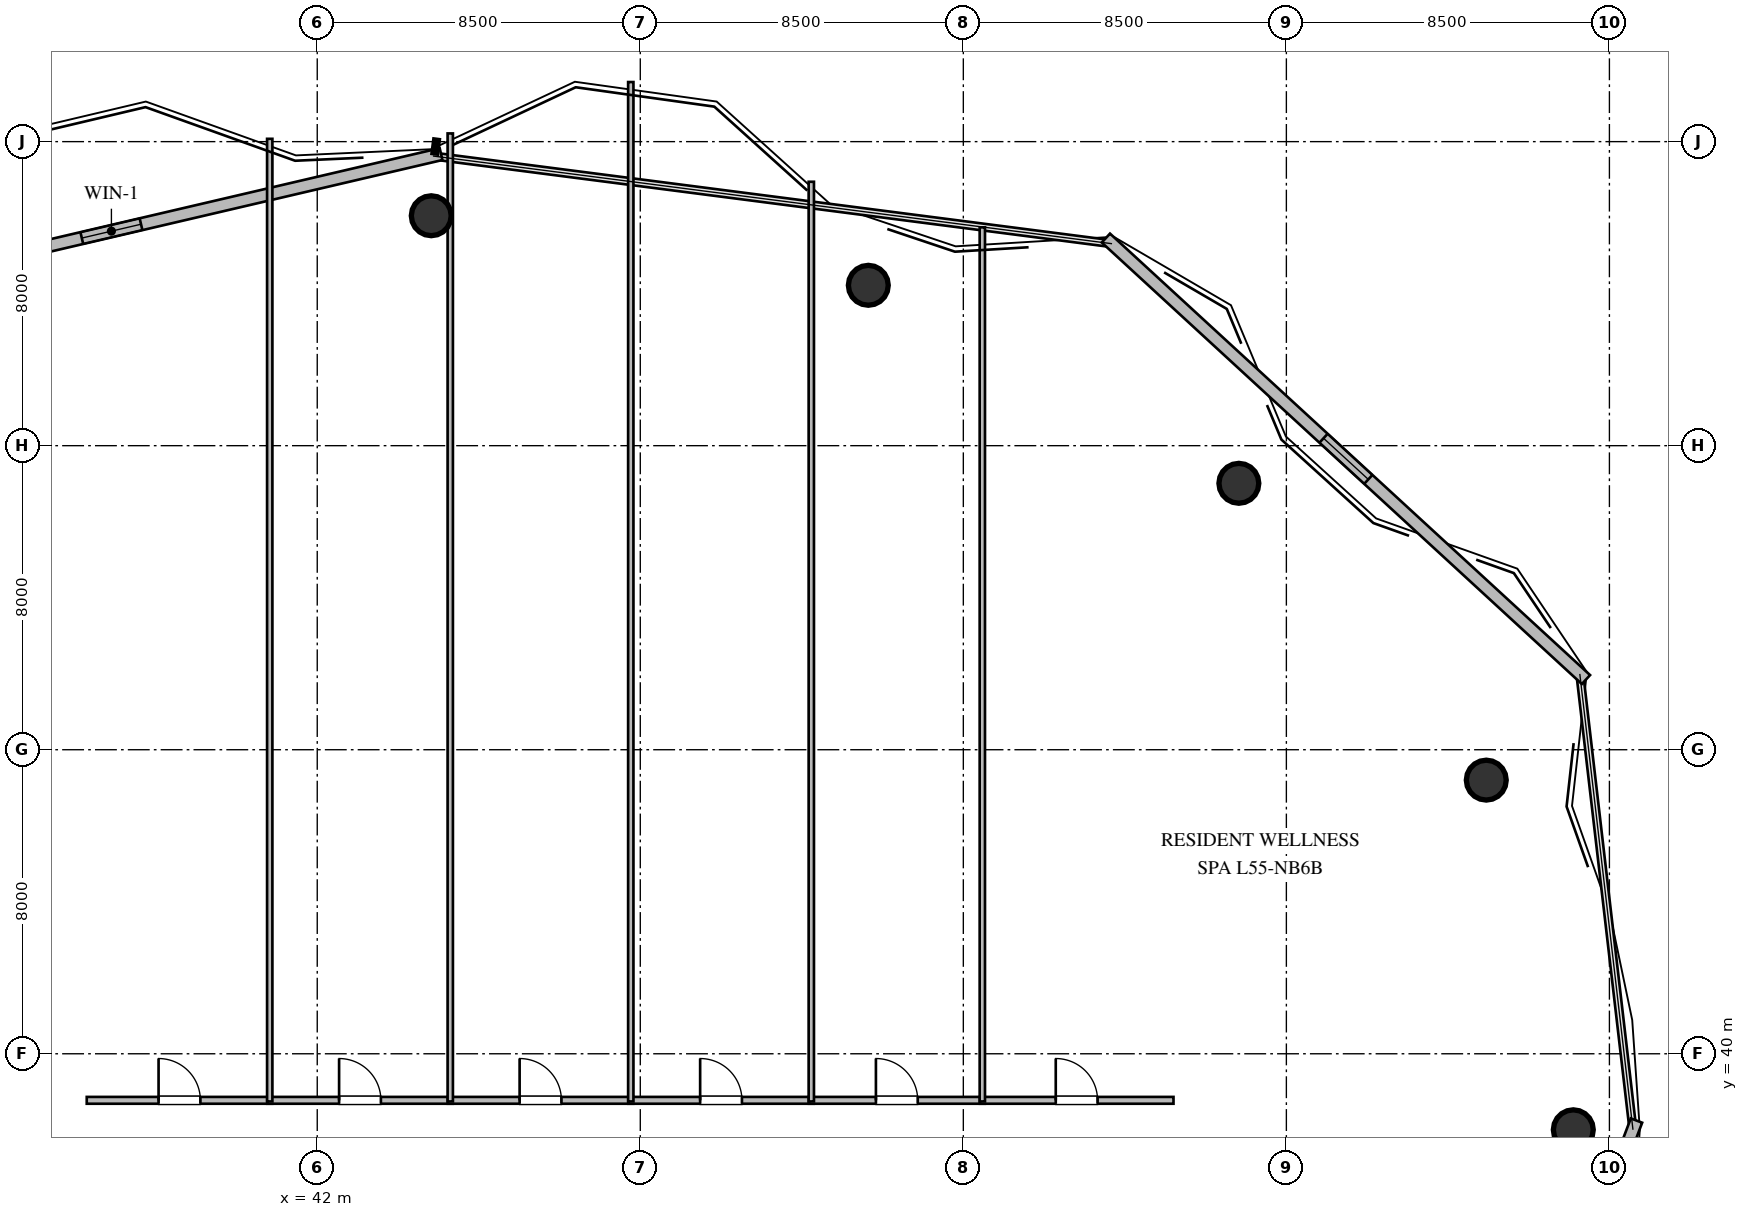
"""IFC4 building model, lengths in metres.
Left out: names, types, materials, properties, quantities, classifications, styles, units other than length and angle.
Written with IfcOpenShell. Run it as: python <this file> out.ifc"""

import sys

from ifc_helpers import new_model, si_unit, direction, frame, frame_2d, origin, origin_2d, place, context, subcontext, project, spatial, rectangle, circle, extrude, element, fill, save


model = new_model("IFC4")
c1 = context("Model", 3, precision=1e-05, world=origin(), true_north=direction((0.0, 1.0)))
c2 = subcontext(c1, "Body", "Model", "MODEL_VIEW")
j1 = project(units=[si_unit("LENGTHUNIT", "METRE"), si_unit("PLANEANGLEUNIT", "RADIAN")], contexts=[c1])
p1 = place(None, origin())
s1 = spatial("IfcSite", under=j1, at=p1, CompositionType="ELEMENT")
p2 = place(p1, origin())
s2 = spatial("IfcBuilding", under=s1, at=p2, CompositionType="ELEMENT")
p3 = place(p2, frame((0.0, 0.0, 210.0)))
s3 = spatial("IfcBuildingStorey", under=s2, at=p3, CompositionType="ELEMENT", Elevation=210.0)
for number, where, z_axis, x_axis in (
    (1, (75.05, 38.0, 0.0), (0.0, 0.0, 1.0), (1.0, 0.0, 0.0)),
    (2, (72.76, 47.2, 0.0), (0.0, 0.0, 1.0), (1.0, 0.0, 0.0)),
    (3, (66.25, 55.01, 0.0), (0.0, 0.0, 1.0), (1.0, 0.0, 0.0)),
    (4, (56.5, 60.22, 0.0), (0.0, 0.0, 1.0), (1.0, 0.0, 0.0)),
    (5, (45.0, 62.05, 0.0), (0.0, 0.0, 1.0), (1.0, 0.0, 0.0)),
):
    element("IfcColumn", number, at=place(p3, frame(where, z_axis=z_axis, x_axis=x_axis)), inside=s3, PredefinedType="COLUMN", context=c2, shape_type="SweptSolid", body=[
        extrude(circle(Radius=0.525, at=origin_2d()), origin(), (0.0, 0.0, 1.0), 3.6),
    ])
p4 = place(p3, frame((76.712, 38.243, 0.0), z_axis=(0.0, 0.0, 1.0), x_axis=(-0.353659523244, -0.935374225441, 0.0)))
e6 = element("IfcWall", 6, at=p4, inside=s3, PredefinedType="STANDARD", context=c2, shape_type="SweptSolid", body=[
    extrude(rectangle(XDim=14.172, YDim=0.32, at=frame_2d((7.086, 0.0))), origin(), (0.0, 0.0, 1.0), 3.36),
])
p5 = place(p3, frame((27.909, 59.617, 0.0), z_axis=(0.0, 0.0, 1.0), x_axis=(0.973753606594, 0.227604731158, 0.0)))
e7 = element("IfcWall", 7, at=p5, inside=s3, PredefinedType="STANDARD", context=c2, shape_type="SweptSolid", body=[
    extrude(rectangle(XDim=17.817, YDim=0.32, at=frame_2d((8.908, 0.0))), origin(), (0.0, 0.0, 1.0), 3.36),
])
p6 = place(p5, frame((8.109, 0.0, 1.05)))
e8 = element("IfcOpeningElement", 8, at=p6, cuts=e7, PredefinedType="OPENING", context=c2, shape_type="SweptSolid", body=[
    extrude(rectangle(XDim=1.6, YDim=1.5, at=frame_2d((0.8, 0.75))), frame((0.0, 0.17, 0.0), z_axis=(0.0, -1.0, 0.0), x_axis=(1.0, 0.0, 0.0)), (0.0, 0.0, 1.0), 0.34),
])
p7 = place(p3, frame((62.751, 61.463, 0.0), z_axis=(0.0, 0.0, 1.0), x_axis=(0.736063690764, -0.676912286149, 0.0)))
e9 = element("IfcWall", 9, at=p7, inside=s3, PredefinedType="STANDARD", context=c2, shape_type="SweptSolid", body=[
    extrude(rectangle(XDim=17.162, YDim=0.32, at=frame_2d((8.581, 0.0))), origin(), (0.0, 0.0, 1.0), 3.36),
])
p8 = place(p7, frame((7.781, 0.0, 1.05)))
e10 = element("IfcOpeningElement", 10, at=p8, cuts=e9, PredefinedType="OPENING", context=c2, shape_type="SweptSolid", body=[
    extrude(rectangle(XDim=1.6, YDim=1.5, at=frame_2d((0.8, 0.75))), frame((0.0, 0.17, 0.0), z_axis=(0.0, -1.0, 0.0), x_axis=(1.0, 0.0, 0.0)), (0.0, 0.0, 1.0), 0.34),
])
p9 = place(p3, frame((35.935, 38.775, 0.0), z_axis=(0.0, 0.0, 1.0), x_axis=(1.0, 0.0, 0.0)))
e11 = element("IfcWall", 11, at=p9, inside=s3, PredefinedType="PARTITIONING", context=c2, shape_type="SweptSolid", body=[
    extrude(rectangle(XDim=4.88, YDim=0.18, at=frame_2d((2.44, 0.0))), origin(), (0.0, 0.0, 1.0), 3.36),
])
p10 = place(p9, frame((1.89, 0.0, 0.0)))
e12 = element("IfcOpeningElement", 12, at=p10, cuts=e11, PredefinedType="OPENING", context=c2, shape_type="SweptSolid", body=[
    extrude(rectangle(XDim=1.1, YDim=2.1, at=frame_2d((0.55, 1.05))), frame((0.0, 0.1, 0.0), z_axis=(0.0, -1.0, 0.0), x_axis=(1.0, 0.0, 0.0)), (0.0, 0.0, 1.0), 0.2),
])
p11 = place(p3, frame((40.685, 38.775, 0.0), z_axis=(0.0, 0.0, 1.0), x_axis=(1.0, 0.0, 0.0)))
e13 = element("IfcWall", 13, at=p11, inside=s3, PredefinedType="PARTITIONING", context=c2, shape_type="SweptSolid", body=[
    extrude(rectangle(XDim=4.88, YDim=0.18, at=frame_2d((2.44, 0.0))), origin(), (0.0, 0.0, 1.0), 3.36),
])
p12 = place(p11, frame((1.89, 0.0, 0.0)))
e14 = element("IfcOpeningElement", 14, at=p12, cuts=e13, PredefinedType="OPENING", context=c2, shape_type="SweptSolid", body=[
    extrude(rectangle(XDim=1.1, YDim=2.1, at=frame_2d((0.55, 1.05))), frame((0.0, 0.1, 0.0), z_axis=(0.0, -1.0, 0.0), x_axis=(1.0, 0.0, 0.0)), (0.0, 0.0, 1.0), 0.2),
])
p13 = place(p3, frame((45.435, 38.775, 0.0), z_axis=(0.0, 0.0, 1.0), x_axis=(1.0, 0.0, 0.0)))
e15 = element("IfcWall", 15, at=p13, inside=s3, PredefinedType="PARTITIONING", context=c2, shape_type="SweptSolid", body=[
    extrude(rectangle(XDim=4.88, YDim=0.18, at=frame_2d((2.44, 0.0))), origin(), (0.0, 0.0, 1.0), 3.36),
])
p14 = place(p13, frame((1.89, 0.0, 0.0)))
e16 = element("IfcOpeningElement", 16, at=p14, cuts=e15, PredefinedType="OPENING", context=c2, shape_type="SweptSolid", body=[
    extrude(rectangle(XDim=1.1, YDim=2.1, at=frame_2d((0.55, 1.05))), frame((0.0, 0.1, 0.0), z_axis=(0.0, -1.0, 0.0), x_axis=(1.0, 0.0, 0.0)), (0.0, 0.0, 1.0), 0.2),
])
p15 = place(p3, frame((50.185, 38.775, 0.0), z_axis=(0.0, 0.0, 1.0), x_axis=(1.0, 0.0, 0.0)))
e17 = element("IfcWall", 17, at=p15, inside=s3, PredefinedType="PARTITIONING", context=c2, shape_type="SweptSolid", body=[
    extrude(rectangle(XDim=4.88, YDim=0.18, at=frame_2d((2.44, 0.0))), origin(), (0.0, 0.0, 1.0), 3.36),
])
p16 = place(p15, frame((1.89, 0.0, 0.0)))
e18 = element("IfcOpeningElement", 18, at=p16, cuts=e17, PredefinedType="OPENING", context=c2, shape_type="SweptSolid", body=[
    extrude(rectangle(XDim=1.1, YDim=2.1, at=frame_2d((0.55, 1.05))), frame((0.0, 0.1, 0.0), z_axis=(0.0, -1.0, 0.0), x_axis=(1.0, 0.0, 0.0)), (0.0, 0.0, 1.0), 0.2),
])
p17 = place(p3, frame((54.935, 38.775, 0.0), z_axis=(0.0, 0.0, 1.0), x_axis=(1.0, 0.0, 0.0)))
e19 = element("IfcWall", 19, at=p17, inside=s3, PredefinedType="PARTITIONING", context=c2, shape_type="SweptSolid", body=[
    extrude(rectangle(XDim=4.63, YDim=0.18, at=frame_2d((2.315, 0.0))), origin(), (0.0, 0.0, 1.0), 3.36),
])
p18 = place(p17, frame((1.765, 0.0, 0.0)))
e20 = element("IfcOpeningElement", 20, at=p18, cuts=e19, PredefinedType="OPENING", context=c2, shape_type="SweptSolid", body=[
    extrude(rectangle(XDim=1.1, YDim=2.1, at=frame_2d((0.55, 1.05))), frame((0.0, 0.1, 0.0), z_axis=(0.0, -1.0, 0.0), x_axis=(1.0, 0.0, 0.0)), (0.0, 0.0, 1.0), 0.2),
])
p19 = place(p3, frame((59.435, 38.775, 0.0), z_axis=(0.0, 0.0, 1.0), x_axis=(1.0, 0.0, 0.0)))
e21 = element("IfcWall", 21, at=p19, inside=s3, PredefinedType="PARTITIONING", context=c2, shape_type="SweptSolid", body=[
    extrude(rectangle(XDim=5.095, YDim=0.18, at=frame_2d((2.547, 0.0))), origin(), (0.0, 0.0, 1.0), 3.36),
])
p20 = place(p19, frame((1.997, 0.0, 0.0)))
e22 = element("IfcOpeningElement", 22, at=p20, cuts=e21, PredefinedType="OPENING", context=c2, shape_type="SweptSolid", body=[
    extrude(rectangle(XDim=1.1, YDim=2.1, at=frame_2d((0.55, 1.05))), frame((0.0, 0.1, 0.0), z_axis=(0.0, -1.0, 0.0), x_axis=(1.0, 0.0, 0.0)), (0.0, 0.0, 1.0), 0.2),
])
p21 = place(p3, frame((40.75, 64.074, 0.0), z_axis=(0.0, 0.0, 1.0), x_axis=(0.0, -1.0, 0.0)))
e23 = element("IfcWall", 23, at=p21, inside=s3, PredefinedType="PARTITIONING", context=c2, shape_type="SweptSolid", body=[
    extrude(rectangle(XDim=25.329, YDim=0.14, at=frame_2d((12.665, 0.0))), origin(), (0.0, 0.0, 1.0), 3.36),
])
p22 = place(p3, frame((45.5, 64.216, 0.0), z_axis=(0.0, 0.0, 1.0), x_axis=(0.0, -1.0, 0.0)))
e24 = element("IfcWall", 24, at=p22, inside=s3, PredefinedType="PARTITIONING", context=c2, shape_type="SweptSolid", body=[
    extrude(rectangle(XDim=25.471, YDim=0.14, at=frame_2d((12.735, 0.0))), origin(), (0.0, 0.0, 1.0), 2.89),
])
p23 = place(p3, frame((50.25, 65.568, 0.0), z_axis=(0.0, 0.0, 1.0), x_axis=(0.0, -1.0, 0.0)))
e25 = element("IfcWall", 25, at=p23, inside=s3, PredefinedType="PARTITIONING", context=c2, shape_type="SweptSolid", body=[
    extrude(rectangle(XDim=26.823, YDim=0.14, at=frame_2d((13.412, 0.0))), origin(), (0.0, 0.0, 1.0), 3.36),
])
p24 = place(p3, frame((55.0, 62.944, 0.0), z_axis=(0.0, 0.0, 1.0), x_axis=(0.0, -1.0, 0.0)))
e26 = element("IfcWall", 26, at=p24, inside=s3, PredefinedType="PARTITIONING", context=c2, shape_type="SweptSolid", body=[
    extrude(rectangle(XDim=24.199, YDim=0.14, at=frame_2d((12.1, 0.0))), origin(), (0.0, 0.0, 1.0), 3.36),
])
p25 = place(p3, frame((59.5, 61.745, 0.0), z_axis=(0.0, 0.0, 1.0), x_axis=(0.0, -1.0, 0.0)))
e27 = element("IfcWall", 27, at=p25, inside=s3, PredefinedType="PARTITIONING", context=c2, shape_type="SweptSolid", body=[
    extrude(rectangle(XDim=23.0, YDim=0.14, at=frame_2d((11.5, 0.0))), origin(), (0.0, 0.0, 1.0), 2.996),
])
p26 = place(p6, origin())
e28 = element("IfcWindow", 28, at=p26, inside=s3, PartitioningType="SINGLE_PANEL", PredefinedType="WINDOW", context=c2, shape_type="SweptSolid", body=[
    extrude(rectangle(XDim=1.6, YDim=1.5, at=frame_2d((0.8, 0.75))), frame((0.0, 0.03, 0.0), z_axis=(0.0, -1.0, 0.0), x_axis=(1.0, 0.0, 0.0)), (0.0, 0.0, 1.0), 0.06),
])
fill(e8, e28)
p27 = place(p8, origin())
e29 = element("IfcWindow", 29, at=p27, inside=s3, PartitioningType="SINGLE_PANEL", PredefinedType="WINDOW", context=c2, shape_type="SweptSolid", body=[
    extrude(rectangle(XDim=1.6, YDim=1.5, at=frame_2d((0.8, 0.75))), frame((0.0, 0.03, 0.0), z_axis=(0.0, -1.0, 0.0), x_axis=(1.0, 0.0, 0.0)), (0.0, 0.0, 1.0), 0.06),
])
fill(e10, e29)
p28 = place(p10, origin())
e30 = element("IfcDoor", 30, at=p28, inside=s3, OperationType="SINGLE_SWING_LEFT", PredefinedType="DOOR", context=c2, shape_type="SweptSolid", body=[
    extrude(rectangle(XDim=1.1, YDim=2.1, at=frame_2d((0.55, 1.05))), frame((0.0, 0.025, 0.0), z_axis=(0.0, -1.0, 0.0), x_axis=(1.0, 0.0, 0.0)), (0.0, 0.0, 1.0), 0.05),
])
fill(e12, e30)
p29 = place(p12, origin())
e31 = element("IfcDoor", 31, at=p29, inside=s3, OperationType="SINGLE_SWING_LEFT", PredefinedType="DOOR", context=c2, shape_type="SweptSolid", body=[
    extrude(rectangle(XDim=1.1, YDim=2.1, at=frame_2d((0.55, 1.05))), frame((0.0, 0.025, 0.0), z_axis=(0.0, -1.0, 0.0), x_axis=(1.0, 0.0, 0.0)), (0.0, 0.0, 1.0), 0.05),
])
fill(e14, e31)
p30 = place(p14, origin())
e32 = element("IfcDoor", 32, at=p30, inside=s3, OperationType="SINGLE_SWING_LEFT", PredefinedType="DOOR", context=c2, shape_type="SweptSolid", body=[
    extrude(rectangle(XDim=1.1, YDim=2.1, at=frame_2d((0.55, 1.05))), frame((0.0, 0.025, 0.0), z_axis=(0.0, -1.0, 0.0), x_axis=(1.0, 0.0, 0.0)), (0.0, 0.0, 1.0), 0.05),
])
fill(e16, e32)
p31 = place(p16, origin())
e33 = element("IfcDoor", 33, at=p31, inside=s3, OperationType="SINGLE_SWING_LEFT", PredefinedType="DOOR", context=c2, shape_type="SweptSolid", body=[
    extrude(rectangle(XDim=1.1, YDim=2.1, at=frame_2d((0.55, 1.05))), frame((0.0, 0.025, 0.0), z_axis=(0.0, -1.0, 0.0), x_axis=(1.0, 0.0, 0.0)), (0.0, 0.0, 1.0), 0.05),
])
fill(e18, e33)
p32 = place(p18, origin())
e34 = element("IfcDoor", 34, at=p32, inside=s3, OperationType="SINGLE_SWING_LEFT", PredefinedType="DOOR", context=c2, shape_type="SweptSolid", body=[
    extrude(rectangle(XDim=1.1, YDim=2.1, at=frame_2d((0.55, 1.05))), frame((0.0, 0.025, 0.0), z_axis=(0.0, -1.0, 0.0), x_axis=(1.0, 0.0, 0.0)), (0.0, 0.0, 1.0), 0.05),
])
fill(e20, e34)
p33 = place(p20, origin())
e35 = element("IfcDoor", 35, at=p33, inside=s3, OperationType="SINGLE_SWING_LEFT", PredefinedType="DOOR", context=c2, shape_type="SweptSolid", body=[
    extrude(rectangle(XDim=1.1, YDim=2.1, at=frame_2d((0.55, 1.05))), frame((0.0, 0.025, 0.0), z_axis=(0.0, -1.0, 0.0), x_axis=(1.0, 0.0, 0.0)), (0.0, 0.0, 1.0), 0.05),
])
fill(e22, e35)
save(model, sys.argv[1])
